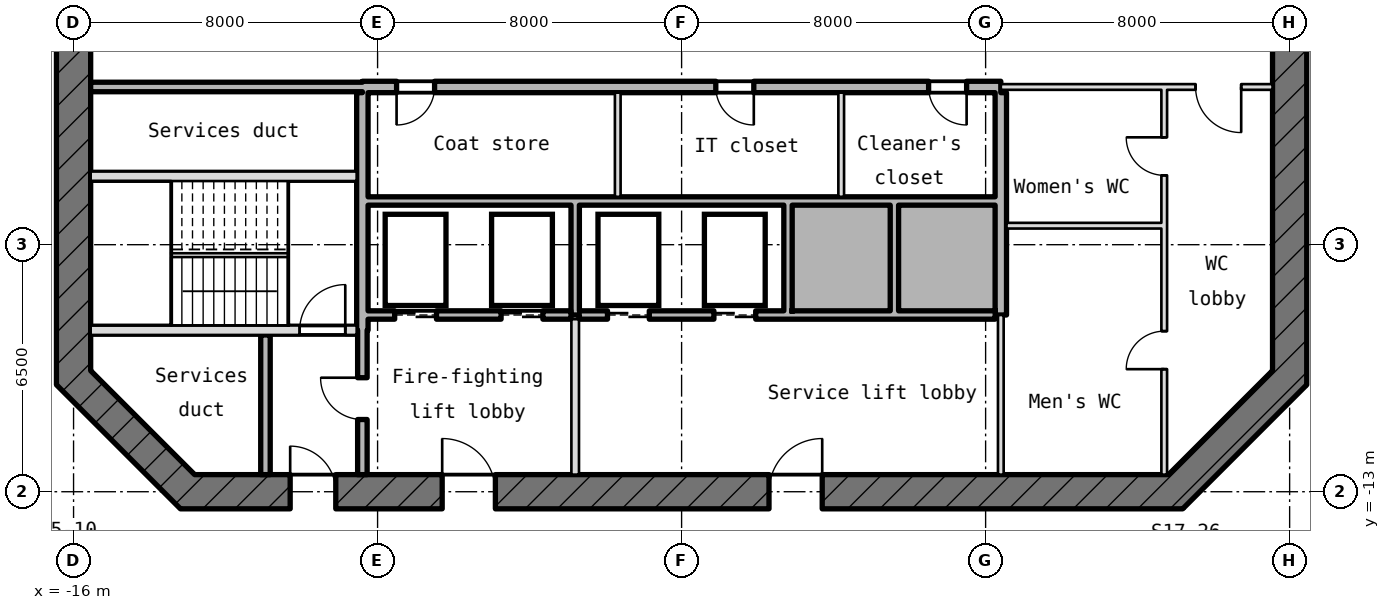
"""IFC4 building model, lengths in metres.
Left out: names, types, materials, properties, quantities, classifications, styles, units other than length and angle.
Written with IfcOpenShell. Run it as: python <this file> out.ifc"""

import sys

from ifc_helpers import new_model, si_unit, direction, frame, frame_2d, origin, place, context, subcontext, project, spatial, rectangle, extrude, element, fill, save


model = new_model("IFC4")
c1 = context("Model", 3, precision=1e-05, world=origin(), true_north=direction((0.0, 1.0)))
c2 = subcontext(c1, "Body", "Model", "MODEL_VIEW")
j1 = project(units=[si_unit("LENGTHUNIT", "METRE"), si_unit("PLANEANGLEUNIT", "RADIAN")], contexts=[c1])
p1 = place(None, origin())
s1 = spatial("IfcSite", under=j1, at=p1, CompositionType="ELEMENT")
p2 = place(p1, origin())
s2 = spatial("IfcBuilding", under=s1, at=p2, CompositionType="ELEMENT")
p3 = place(p2, frame((0.0, 0.0, 248.2)))
s3 = spatial("IfcBuildingStorey", under=s2, at=p3, CompositionType="ELEMENT", Elevation=248.2)
p4 = place(p3, frame((12.868, -13.132, -0.18), z_axis=(0.0, 0.0, 1.0), x_axis=(0.707106781187, 0.707106781187, 0.0)))
e1 = element("IfcWall", 1, at=p4, inside=s3, PredefinedType="SHEAR", context=c2, shape_type="SweptSolid", body=[
    extrude(rectangle(XDim=4.615, YDim=0.9, at=frame_2d((2.308, 0.0))), origin(), (0.0, 0.0, 1.0), 4.15),
])
p5 = place(p3, frame((16.0, -10.186, -0.18), z_axis=(0.0, 0.0, 1.0), x_axis=(0.0, 1.0, 0.0)))
e2 = element("IfcWall", 2, at=p5, inside=s3, PredefinedType="SHEAR", context=c2, shape_type="SweptSolid", body=[
    extrude(rectangle(XDim=20.373, YDim=0.9, at=frame_2d((10.186, 0.0))), origin(), (0.0, 0.0, 1.0), 4.15),
])
p6 = place(p5, frame((8.986, 0.0, 0.18)))
e3 = element("IfcOpeningElement", 3, at=p6, cuts=e2, PredefinedType="OPENING", context=c2, shape_type="SweptSolid", body=[
    extrude(rectangle(XDim=2.4, YDim=2.1, at=frame_2d((1.2, 1.05))), frame((0.0, 0.46, 0.0), z_axis=(0.0, -1.0, 0.0), x_axis=(1.0, 0.0, 0.0)), (0.0, 0.0, 1.0), 0.92),
])
p7 = place(p5, frame((13.586, 0.0, 0.18)))
e4 = element("IfcOpeningElement", 4, at=p7, cuts=e2, PredefinedType="OPENING", context=c2, shape_type="SweptSolid", body=[
    extrude(rectangle(XDim=1.2, YDim=2.1, at=frame_2d((0.6, 1.05))), frame((0.0, 0.46, 0.0), z_axis=(0.0, -1.0, 0.0), x_axis=(1.0, 0.0, 0.0)), (0.0, 0.0, 1.0), 0.92),
])
p8 = place(p3, frame((-16.0, 10.186, -0.18), z_axis=(0.0, 0.0, 1.0), x_axis=(0.0, -1.0, 0.0)))
e5 = element("IfcWall", 5, at=p8, inside=s3, PredefinedType="SHEAR", context=c2, shape_type="SweptSolid", body=[
    extrude(rectangle(XDim=20.373, YDim=0.9, at=frame_2d((10.186, 0.0))), origin(), (0.0, 0.0, 1.0), 4.15),
])
p9 = place(p8, frame((8.986, 0.0, 0.18)))
e6 = element("IfcOpeningElement", 6, at=p9, cuts=e5, PredefinedType="OPENING", context=c2, shape_type="SweptSolid", body=[
    extrude(rectangle(XDim=2.4, YDim=2.1, at=frame_2d((1.2, 1.05))), frame((0.0, 0.46, 0.0), z_axis=(0.0, -1.0, 0.0), x_axis=(1.0, 0.0, 0.0)), (0.0, 0.0, 1.0), 0.92),
])
p10 = place(p8, frame((5.586, 0.0, 0.18)))
e7 = element("IfcOpeningElement", 7, at=p10, cuts=e5, PredefinedType="OPENING", context=c2, shape_type="SweptSolid", body=[
    extrude(rectangle(XDim=1.2, YDim=2.1, at=frame_2d((0.6, 1.05))), frame((0.0, 0.46, 0.0), z_axis=(0.0, -1.0, 0.0), x_axis=(1.0, 0.0, 0.0)), (0.0, 0.0, 1.0), 0.92),
])
p11 = place(p3, frame((-16.132, -9.868, -0.18), z_axis=(0.0, 0.0, 1.0), x_axis=(0.707106781187, -0.707106781187, 0.0)))
e8 = element("IfcWall", 8, at=p11, inside=s3, PredefinedType="SHEAR", context=c2, shape_type="SweptSolid", body=[
    extrude(rectangle(XDim=4.615, YDim=0.9, at=frame_2d((2.308, 0.0))), origin(), (0.0, 0.0, 1.0), 4.15),
])
p12 = place(p3, frame((-13.186, -13.0, -0.18), z_axis=(0.0, 0.0, 1.0), x_axis=(1.0, 0.0, 0.0)))
e9 = element("IfcWall", 9, at=p12, inside=s3, PredefinedType="SHEAR", context=c2, shape_type="SweptSolid", body=[
    extrude(rectangle(XDim=26.373, YDim=0.9, at=frame_2d((13.186, 0.0))), origin(), (0.0, 0.0, 1.0), 4.15),
])
p13 = place(p12, frame((2.886, 0.0, 0.18)))
e10 = element("IfcOpeningElement", 10, at=p13, cuts=e9, PredefinedType="OPENING", context=c2, shape_type="SweptSolid", body=[
    extrude(rectangle(XDim=1.2, YDim=2.1, at=frame_2d((0.6, 1.05))), frame((0.0, 0.46, 0.0), z_axis=(0.0, -1.0, 0.0), x_axis=(1.0, 0.0, 0.0)), (0.0, 0.0, 1.0), 0.92),
])
p14 = place(p12, frame((6.886, 0.0, 0.18)))
e11 = element("IfcOpeningElement", 11, at=p14, cuts=e9, PredefinedType="OPENING", context=c2, shape_type="SweptSolid", body=[
    extrude(rectangle(XDim=1.4, YDim=2.1, at=frame_2d((0.7, 1.05))), frame((0.0, 0.46, 0.0), z_axis=(0.0, -1.0, 0.0), x_axis=(1.0, 0.0, 0.0)), (0.0, 0.0, 1.0), 0.92),
])
p15 = place(p12, frame((15.486, 0.0, 0.18)))
e12 = element("IfcOpeningElement", 12, at=p15, cuts=e9, PredefinedType="OPENING", context=c2, shape_type="SweptSolid", body=[
    extrude(rectangle(XDim=1.4, YDim=2.1, at=frame_2d((0.7, 1.05))), frame((0.0, 0.46, 0.0), z_axis=(0.0, -1.0, 0.0), x_axis=(1.0, 0.0, 0.0)), (0.0, 0.0, 1.0), 0.92),
])
p16 = place(p3, frame((-15.55, -8.75, -0.18), z_axis=(0.0, 0.0, 1.0), x_axis=(1.0, 0.0, 0.0)))
e13 = element("IfcWall", 13, at=p16, inside=s3, PredefinedType="SHEAR", context=c2, shape_type="SweptSolid", body=[
    extrude(rectangle(XDim=7.0, YDim=0.25, at=frame_2d((3.5, 0.0))), origin(), (0.0, 0.0, 1.0), 4.15),
])
p17 = place(p16, frame((5.5, 0.0, 0.18)))
e14 = element("IfcOpeningElement", 14, at=p17, cuts=e13, PredefinedType="OPENING", context=c2, shape_type="SweptSolid", body=[
    extrude(rectangle(XDim=1.2, YDim=2.1, at=frame_2d((0.6, 1.05))), frame((0.0, 0.135, 0.0), z_axis=(0.0, -1.0, 0.0), x_axis=(1.0, 0.0, 0.0)), (0.0, 0.0, 1.0), 0.27),
])
p18 = place(p3, frame((-8.25, -8.35, 0.0), z_axis=(0.0, 0.0, 1.0), x_axis=(1.0, 0.0, 0.0)))
e15 = element("IfcWall", 15, at=p18, inside=s3, PredefinedType="STANDARD", context=c2, shape_type="SweptSolid", body=[
    extrude(rectangle(XDim=5.34, YDim=0.22, at=frame_2d((2.67, 0.0))), origin(), (0.0, 0.0, 1.0), 3.97),
])
p19 = place(p18, frame((0.7, 0.0, 0.0)))
e16 = element("IfcOpeningElement", 16, at=p19, cuts=e15, PredefinedType="OPENING", context=c2, shape_type="SweptSolid", body=[
    extrude(rectangle(XDim=1.1, YDim=2.1, at=frame_2d((0.55, 1.05))), frame((0.0, 0.12, 0.0), z_axis=(0.0, -1.0, 0.0), x_axis=(1.0, 0.0, 0.0)), (0.0, 0.0, 1.0), 0.24),
])
p20 = place(p18, frame((3.5, 0.0, 0.0)))
e17 = element("IfcOpeningElement", 17, at=p20, cuts=e15, PredefinedType="OPENING", context=c2, shape_type="SweptSolid", body=[
    extrude(rectangle(XDim=1.1, YDim=2.1, at=frame_2d((0.55, 1.05))), frame((0.0, 0.12, 0.0), z_axis=(0.0, -1.0, 0.0), x_axis=(1.0, 0.0, 0.0)), (0.0, 0.0, 1.0), 0.24),
])
p21 = place(p3, frame((-2.69, -8.35, 0.0), z_axis=(0.0, 0.0, 1.0), x_axis=(1.0, 0.0, 0.0)))
e18 = element("IfcWall", 18, at=p21, inside=s3, PredefinedType="STANDARD", context=c2, shape_type="SweptSolid", body=[
    extrude(rectangle(XDim=10.94, YDim=0.22, at=frame_2d((5.47, 0.0))), origin(), (0.0, 0.0, 1.0), 3.97),
])
p22 = place(p21, frame((0.74, 0.0, 0.0)))
e19 = element("IfcOpeningElement", 19, at=p22, cuts=e18, PredefinedType="OPENING", context=c2, shape_type="SweptSolid", body=[
    extrude(rectangle(XDim=1.1, YDim=2.1, at=frame_2d((0.55, 1.05))), frame((0.0, 0.12, 0.0), z_axis=(0.0, -1.0, 0.0), x_axis=(1.0, 0.0, 0.0)), (0.0, 0.0, 1.0), 0.24),
])
p23 = place(p21, frame((3.54, 0.0, 0.0)))
e20 = element("IfcOpeningElement", 20, at=p23, cuts=e18, PredefinedType="OPENING", context=c2, shape_type="SweptSolid", body=[
    extrude(rectangle(XDim=1.1, YDim=2.1, at=frame_2d((0.55, 1.05))), frame((0.0, 0.12, 0.0), z_axis=(0.0, -1.0, 0.0), x_axis=(1.0, 0.0, 0.0)), (0.0, 0.0, 1.0), 0.24),
])
p24 = place(p3, frame((8.55, -6.0, 0.0), z_axis=(0.0, 0.0, 1.0), x_axis=(1.0, 0.0, 0.0)))
e21 = element("IfcWall", 21, at=p24, inside=s3, PredefinedType="PARTITIONING", context=c2, shape_type="SweptSolid", body=[
    extrude(rectangle(XDim=4.075, YDim=0.15, at=frame_2d((2.038, 0.0))), origin(), (0.0, 0.0, 1.0), 3.97),
])
p25 = place(p3, frame((-8.25, -5.35, 0.0), z_axis=(0.0, 0.0, 1.0), x_axis=(1.0, 0.0, 0.0)))
e22 = element("IfcWall", 22, at=p25, inside=s3, PredefinedType="STANDARD", context=c2, shape_type="SweptSolid", body=[
    extrude(rectangle(XDim=16.5, YDim=0.22, at=frame_2d((8.25, 0.0))), origin(), (0.0, 0.0, 1.0), 3.97),
])
p26 = place(p3, frame((-15.55, -4.7, -0.18), z_axis=(0.0, 0.0, 1.0), x_axis=(1.0, 0.0, 0.0)))
e23 = element("IfcWall", 23, at=p26, inside=s3, PredefinedType="SHEAR", context=c2, shape_type="SweptSolid", body=[
    extrude(rectangle(XDim=7.0, YDim=0.25, at=frame_2d((3.5, 0.0))), origin(), (0.0, 0.0, 1.0), 4.15),
])
p27 = place(p3, frame((-15.55, -2.35, 0.0), z_axis=(0.0, 0.0, 1.0), x_axis=(1.0, 0.0, 0.0)))
e24 = element("IfcWall", 24, at=p27, inside=s3, PredefinedType="STANDARD", context=c2, shape_type="SweptSolid", body=[
    extrude(rectangle(XDim=7.15, YDim=0.25, at=frame_2d((3.575, 0.0))), origin(), (0.0, 0.0, 1.0), 3.97),
])
p28 = place(p3, frame((-8.4, -2.35, -0.18), z_axis=(0.0, 0.0, 1.0), x_axis=(1.0, 0.0, 0.0)))
e25 = element("IfcWall", 25, at=p28, inside=s3, PredefinedType="SHEAR", context=c2, shape_type="SweptSolid", body=[
    extrude(rectangle(XDim=16.8, YDim=0.3, at=frame_2d((8.4, 0.0))), origin(), (0.0, 0.0, 1.0), 4.15),
])
p29 = place(p28, frame((0.9, 0.0, 0.18)))
e26 = element("IfcOpeningElement", 26, at=p29, cuts=e25, PredefinedType="OPENING", context=c2, shape_type="SweptSolid", body=[
    extrude(rectangle(XDim=1.0, YDim=2.1, at=frame_2d((0.5, 1.05))), frame((0.0, 0.16, 0.0), z_axis=(0.0, -1.0, 0.0), x_axis=(1.0, 0.0, 0.0)), (0.0, 0.0, 1.0), 0.32),
])
p30 = place(p28, frame((9.3, 0.0, 0.18)))
e27 = element("IfcOpeningElement", 27, at=p30, cuts=e25, PredefinedType="OPENING", context=c2, shape_type="SweptSolid", body=[
    extrude(rectangle(XDim=1.0, YDim=2.1, at=frame_2d((0.5, 1.05))), frame((0.0, 0.16, 0.0), z_axis=(0.0, -1.0, 0.0), x_axis=(1.0, 0.0, 0.0)), (0.0, 0.0, 1.0), 0.32),
])
p31 = place(p28, frame((14.9, 0.0, 0.18)))
e28 = element("IfcOpeningElement", 28, at=p31, cuts=e25, PredefinedType="OPENING", context=c2, shape_type="SweptSolid", body=[
    extrude(rectangle(XDim=1.0, YDim=2.1, at=frame_2d((0.5, 1.05))), frame((0.0, 0.16, 0.0), z_axis=(0.0, -1.0, 0.0), x_axis=(1.0, 0.0, 0.0)), (0.0, 0.0, 1.0), 0.32),
])
p32 = place(p3, frame((8.4, -2.35, 0.0), z_axis=(0.0, 0.0, 1.0), x_axis=(1.0, 0.0, 0.0)))
e29 = element("IfcWall", 29, at=p32, inside=s3, PredefinedType="PARTITIONING", context=c2, shape_type="SweptSolid", body=[
    extrude(rectangle(XDim=7.15, YDim=0.15, at=frame_2d((3.575, 0.0))), origin(), (0.0, 0.0, 1.0), 3.97),
])
p33 = place(p32, frame((5.125, 0.0, 0.0)))
e30 = element("IfcOpeningElement", 30, at=p33, cuts=e29, PredefinedType="OPENING", context=c2, shape_type="SweptSolid", body=[
    extrude(rectangle(XDim=1.2, YDim=2.1, at=frame_2d((0.6, 1.05))), frame((0.0, 0.085, 0.0), z_axis=(0.0, -1.0, 0.0), x_axis=(1.0, 0.0, 0.0)), (0.0, 0.0, 1.0), 0.17),
])
p34 = place(p3, frame((-10.95, -12.55, 0.0), z_axis=(0.0, 0.0, 1.0), x_axis=(0.0, 1.0, 0.0)))
e31 = element("IfcWall", 31, at=p34, inside=s3, PredefinedType="STANDARD", context=c2, shape_type="SweptSolid", body=[
    extrude(rectangle(XDim=3.675, YDim=0.25, at=frame_2d((1.837, 0.0))), origin(), (0.0, 0.0, 1.0), 3.97),
])
p35 = place(p3, frame((-8.4, -12.55, 0.0), z_axis=(0.0, 0.0, 1.0), x_axis=(0.0, 1.0, 0.0)))
e32 = element("IfcWall", 32, at=p35, inside=s3, PredefinedType="STANDARD", context=c2, shape_type="SweptSolid", body=[
    extrude(rectangle(XDim=3.8, YDim=0.25, at=frame_2d((1.9, 0.0))), origin(), (0.0, 0.0, 1.0), 3.97),
])
p36 = place(p35, frame((1.45, 0.0, 0.0)))
e33 = element("IfcOpeningElement", 33, at=p36, cuts=e32, PredefinedType="OPENING", context=c2, shape_type="SweptSolid", body=[
    extrude(rectangle(XDim=1.1, YDim=2.1, at=frame_2d((0.55, 1.05))), frame((0.0, 0.135, 0.0), z_axis=(0.0, -1.0, 0.0), x_axis=(1.0, 0.0, 0.0)), (0.0, 0.0, 1.0), 0.27),
])
p37 = place(p3, frame((-8.4, -8.75, -0.18), z_axis=(0.0, 0.0, 1.0), x_axis=(0.0, 1.0, 0.0)))
e34 = element("IfcWall", 34, at=p37, inside=s3, PredefinedType="SHEAR", context=c2, shape_type="SweptSolid", body=[
    extrude(rectangle(XDim=6.25, YDim=0.3, at=frame_2d((3.125, 0.0))), origin(), (0.0, 0.0, 1.0), 4.15),
])
p38 = place(p3, frame((-2.8, -12.55, 0.0), z_axis=(0.0, 0.0, 1.0), x_axis=(0.0, 1.0, 0.0)))
e35 = element("IfcWall", 35, at=p38, inside=s3, PredefinedType="PARTITIONING", context=c2, shape_type="SweptSolid", body=[
    extrude(rectangle(XDim=4.09, YDim=0.2, at=frame_2d((2.045, 0.0))), origin(), (0.0, 0.0, 1.0), 3.97),
])
p39 = place(p3, frame((-2.8, -8.35, 0.0), z_axis=(0.0, 0.0, 1.0), x_axis=(0.0, 1.0, 0.0)))
e36 = element("IfcWall", 36, at=p39, inside=s3, PredefinedType="STANDARD", context=c2, shape_type="SweptSolid", body=[
    extrude(rectangle(XDim=2.89, YDim=0.22, at=frame_2d((1.445, 0.0))), origin(), (0.0, 0.0, 1.0), 3.97),
])
p40 = place(p3, frame((-1.68, -5.24, 0.0), z_axis=(0.0, 0.0, 1.0), x_axis=(0.0, 1.0, 0.0)))
e37 = element("IfcWall", 37, at=p40, inside=s3, PredefinedType="PARTITIONING", context=c2, shape_type="SweptSolid", body=[
    extrude(rectangle(XDim=2.74, YDim=0.15, at=frame_2d((1.37, 0.0))), origin(), (0.0, 0.0, 1.0), 3.97),
])
p41 = place(p3, frame((2.8, -8.24, 0.0), z_axis=(0.0, 0.0, 1.0), x_axis=(0.0, 1.0, 0.0)))
e38 = element("IfcWall", 38, at=p41, inside=s3, PredefinedType="STANDARD", context=c2, shape_type="SweptSolid", body=[
    extrude(rectangle(XDim=2.78, YDim=0.22, at=frame_2d((1.39, 0.0))), origin(), (0.0, 0.0, 1.0), 3.97),
])
p42 = place(p3, frame((4.2, -5.24, 0.0), z_axis=(0.0, 0.0, 1.0), x_axis=(0.0, 1.0, 0.0)))
e39 = element("IfcWall", 39, at=p42, inside=s3, PredefinedType="PARTITIONING", context=c2, shape_type="SweptSolid", body=[
    extrude(rectangle(XDim=2.74, YDim=0.15, at=frame_2d((1.37, 0.0))), origin(), (0.0, 0.0, 1.0), 3.97),
])
p43 = place(p3, frame((5.6, -8.24, 0.0), z_axis=(0.0, 0.0, 1.0), x_axis=(0.0, 1.0, 0.0)))
e40 = element("IfcWall", 40, at=p43, inside=s3, PredefinedType="STANDARD", context=c2, shape_type="SweptSolid", body=[
    extrude(rectangle(XDim=2.78, YDim=0.22, at=frame_2d((1.39, 0.0))), origin(), (0.0, 0.0, 1.0), 3.97),
])
p44 = place(p3, frame((8.4, -12.55, 0.0), z_axis=(0.0, 0.0, 1.0), x_axis=(0.0, 1.0, 0.0)))
e41 = element("IfcWall", 41, at=p44, inside=s3, PredefinedType="PARTITIONING", context=c2, shape_type="SweptSolid", body=[
    extrude(rectangle(XDim=4.2, YDim=0.15, at=frame_2d((2.1, 0.0))), origin(), (0.0, 0.0, 1.0), 3.97),
])
p45 = place(p3, frame((8.4, -8.35, -0.18), z_axis=(0.0, 0.0, 1.0), x_axis=(0.0, 1.0, 0.0)))
e42 = element("IfcWall", 42, at=p45, inside=s3, PredefinedType="SHEAR", context=c2, shape_type="SweptSolid", body=[
    extrude(rectangle(XDim=5.85, YDim=0.3, at=frame_2d((2.925, 0.0))), origin(), (0.0, 0.0, 1.0), 4.15),
])
p46 = place(p3, frame((12.7, -12.55, 0.0), z_axis=(0.0, 0.0, 1.0), x_axis=(0.0, 1.0, 0.0)))
e43 = element("IfcWall", 43, at=p46, inside=s3, PredefinedType="PARTITIONING", context=c2, shape_type="SweptSolid", body=[
    extrude(rectangle(XDim=10.125, YDim=0.15, at=frame_2d((5.062, 0.0))), origin(), (0.0, 0.0, 1.0), 3.97),
])
p47 = place(p46, frame((7.875, 0.0, 0.0)))
e44 = element("IfcOpeningElement", 44, at=p47, cuts=e43, PredefinedType="OPENING", context=c2, shape_type="SweptSolid", body=[
    extrude(rectangle(XDim=1.0, YDim=2.1, at=frame_2d((0.5, 1.05))), frame((0.0, 0.085, 0.0), z_axis=(0.0, -1.0, 0.0), x_axis=(1.0, 0.0, 0.0)), (0.0, 0.0, 1.0), 0.17),
])
p48 = place(p46, frame((2.775, 0.0, 0.0)))
e45 = element("IfcOpeningElement", 45, at=p48, cuts=e43, PredefinedType="OPENING", context=c2, shape_type="SweptSolid", body=[
    extrude(rectangle(XDim=1.0, YDim=2.1, at=frame_2d((0.5, 1.05))), frame((0.0, 0.085, 0.0), z_axis=(0.0, -1.0, 0.0), x_axis=(1.0, 0.0, 0.0)), (0.0, 0.0, 1.0), 0.17),
])
p49 = place(p19, origin())
e46 = element("IfcDoor", 46, at=p49, inside=s3, OperationType="DOUBLE_DOOR_SLIDING", PredefinedType="DOOR", context=c2, shape_type="SweptSolid", body=[
    extrude(rectangle(XDim=1.1, YDim=2.1, at=frame_2d((0.55, 1.05))), frame((0.0, 0.025, 0.0), z_axis=(0.0, -1.0, 0.0), x_axis=(1.0, 0.0, 0.0)), (0.0, 0.0, 1.0), 0.05),
])
fill(e16, e46)
p50 = place(p20, origin())
e47 = element("IfcDoor", 47, at=p50, inside=s3, OperationType="DOUBLE_DOOR_SLIDING", PredefinedType="DOOR", context=c2, shape_type="SweptSolid", body=[
    extrude(rectangle(XDim=1.1, YDim=2.1, at=frame_2d((0.55, 1.05))), frame((0.0, 0.025, 0.0), z_axis=(0.0, -1.0, 0.0), x_axis=(1.0, 0.0, 0.0)), (0.0, 0.0, 1.0), 0.05),
])
fill(e17, e47)
p51 = place(p22, origin())
e48 = element("IfcDoor", 48, at=p51, inside=s3, OperationType="DOUBLE_DOOR_SLIDING", PredefinedType="DOOR", context=c2, shape_type="SweptSolid", body=[
    extrude(rectangle(XDim=1.1, YDim=2.1, at=frame_2d((0.55, 1.05))), frame((0.0, 0.025, 0.0), z_axis=(0.0, -1.0, 0.0), x_axis=(1.0, 0.0, 0.0)), (0.0, 0.0, 1.0), 0.05),
])
fill(e19, e48)
p52 = place(p23, origin())
e49 = element("IfcDoor", 49, at=p52, inside=s3, OperationType="DOUBLE_DOOR_SLIDING", PredefinedType="DOOR", context=c2, shape_type="SweptSolid", body=[
    extrude(rectangle(XDim=1.1, YDim=2.1, at=frame_2d((0.55, 1.05))), frame((0.0, 0.025, 0.0), z_axis=(0.0, -1.0, 0.0), x_axis=(1.0, 0.0, 0.0)), (0.0, 0.0, 1.0), 0.05),
])
fill(e20, e49)
p53 = place(p17, origin())
e50 = element("IfcDoor", 50, at=p53, inside=s3, OperationType="SINGLE_SWING_RIGHT", PredefinedType="DOOR", context=c2, shape_type="SweptSolid", body=[
    extrude(rectangle(XDim=1.2, YDim=2.1, at=frame_2d((0.6, 1.05))), frame((0.0, 0.025, 0.0), z_axis=(0.0, -1.0, 0.0), x_axis=(1.0, 0.0, 0.0)), (0.0, 0.0, 1.0), 0.05),
])
fill(e14, e50)
p54 = place(p36, origin())
e51 = element("IfcDoor", 51, at=p54, inside=s3, OperationType="SINGLE_SWING_RIGHT", PredefinedType="DOOR", context=c2, shape_type="SweptSolid", body=[
    extrude(rectangle(XDim=1.1, YDim=2.1, at=frame_2d((0.55, 1.05))), frame((0.0, 0.025, 0.0), z_axis=(0.0, -1.0, 0.0), x_axis=(1.0, 0.0, 0.0)), (0.0, 0.0, 1.0), 0.05),
])
fill(e33, e51)
p55 = place(p13, origin())
e52 = element("IfcDoor", 52, at=p55, inside=s3, OperationType="SINGLE_SWING_RIGHT", PredefinedType="DOOR", context=c2, shape_type="SweptSolid", body=[
    extrude(rectangle(XDim=1.2, YDim=2.1, at=frame_2d((0.6, 1.05))), frame((0.0, 0.025, 0.0), z_axis=(0.0, -1.0, 0.0), x_axis=(1.0, 0.0, 0.0)), (0.0, 0.0, 1.0), 0.05),
])
fill(e10, e52)
p56 = place(p14, origin())
e53 = element("IfcDoor", 53, at=p56, inside=s3, OperationType="SINGLE_SWING_RIGHT", PredefinedType="DOOR", context=c2, shape_type="SweptSolid", body=[
    extrude(rectangle(XDim=1.4, YDim=2.1, at=frame_2d((0.7, 1.05))), frame((0.0, 0.025, 0.0), z_axis=(0.0, -1.0, 0.0), x_axis=(1.0, 0.0, 0.0)), (0.0, 0.0, 1.0), 0.05),
])
fill(e11, e53)
p57 = place(p15, origin())
e54 = element("IfcDoor", 54, at=p57, inside=s3, OperationType="SINGLE_SWING_RIGHT", PredefinedType="DOOR", context=c2, shape_type="SweptSolid", body=[
    extrude(rectangle(XDim=1.4, YDim=2.1, at=frame_2d((0.7, 1.05))), frame((0.0, 0.025, 0.0), z_axis=(0.0, -1.0, 0.0), x_axis=(1.0, 0.0, 0.0)), (0.0, 0.0, 1.0), 0.05),
])
fill(e12, e54)
p58 = place(p29, frame((1.0, 0.0, 0.0), z_axis=(0.0, 0.0, 1.0), x_axis=(-1.0, 0.0, 0.0)))
e55 = element("IfcDoor", 55, at=p58, inside=s3, OperationType="SINGLE_SWING_LEFT", PredefinedType="DOOR", context=c2, shape_type="SweptSolid", body=[
    extrude(rectangle(XDim=1.0, YDim=2.1, at=frame_2d((0.5, 1.05))), frame((0.0, 0.025, 0.0), z_axis=(0.0, -1.0, 0.0), x_axis=(1.0, 0.0, 0.0)), (0.0, 0.0, 1.0), 0.05),
])
fill(e26, e55)
p59 = place(p30, frame((1.0, 0.0, 0.0), z_axis=(0.0, 0.0, 1.0), x_axis=(-1.0, 0.0, 0.0)))
e56 = element("IfcDoor", 56, at=p59, inside=s3, OperationType="SINGLE_SWING_LEFT", PredefinedType="DOOR", context=c2, shape_type="SweptSolid", body=[
    extrude(rectangle(XDim=1.0, YDim=2.1, at=frame_2d((0.5, 1.05))), frame((0.0, 0.025, 0.0), z_axis=(0.0, -1.0, 0.0), x_axis=(1.0, 0.0, 0.0)), (0.0, 0.0, 1.0), 0.05),
])
fill(e27, e56)
p60 = place(p31, frame((1.0, 0.0, 0.0), z_axis=(0.0, 0.0, 1.0), x_axis=(-1.0, 0.0, 0.0)))
e57 = element("IfcDoor", 57, at=p60, inside=s3, OperationType="SINGLE_SWING_LEFT", PredefinedType="DOOR", context=c2, shape_type="SweptSolid", body=[
    extrude(rectangle(XDim=1.0, YDim=2.1, at=frame_2d((0.5, 1.05))), frame((0.0, 0.025, 0.0), z_axis=(0.0, -1.0, 0.0), x_axis=(1.0, 0.0, 0.0)), (0.0, 0.0, 1.0), 0.05),
])
fill(e28, e57)
p61 = place(p33, frame((1.2, 0.0, 0.0), z_axis=(0.0, 0.0, 1.0), x_axis=(-1.0, 0.0, 0.0)))
e58 = element("IfcDoor", 58, at=p61, inside=s3, OperationType="SINGLE_SWING_LEFT", PredefinedType="DOOR", context=c2, shape_type="SweptSolid", body=[
    extrude(rectangle(XDim=1.2, YDim=2.1, at=frame_2d((0.6, 1.05))), frame((0.0, 0.025, 0.0), z_axis=(0.0, -1.0, 0.0), x_axis=(1.0, 0.0, 0.0)), (0.0, 0.0, 1.0), 0.05),
])
fill(e30, e58)
p62 = place(p47, origin())
e59 = element("IfcDoor", 59, at=p62, inside=s3, OperationType="SINGLE_SWING_RIGHT", PredefinedType="DOOR", context=c2, shape_type="SweptSolid", body=[
    extrude(rectangle(XDim=1.0, YDim=2.1, at=frame_2d((0.5, 1.05))), frame((0.0, 0.025, 0.0), z_axis=(0.0, -1.0, 0.0), x_axis=(1.0, 0.0, 0.0)), (0.0, 0.0, 1.0), 0.05),
])
fill(e44, e59)
p63 = place(p48, origin())
e60 = element("IfcDoor", 60, at=p63, inside=s3, OperationType="SINGLE_SWING_RIGHT", PredefinedType="DOOR", context=c2, shape_type="SweptSolid", body=[
    extrude(rectangle(XDim=1.0, YDim=2.1, at=frame_2d((0.5, 1.05))), frame((0.0, 0.025, 0.0), z_axis=(0.0, -1.0, 0.0), x_axis=(1.0, 0.0, 0.0)), (0.0, 0.0, 1.0), 0.05),
])
fill(e45, e60)
save(model, sys.argv[1])
